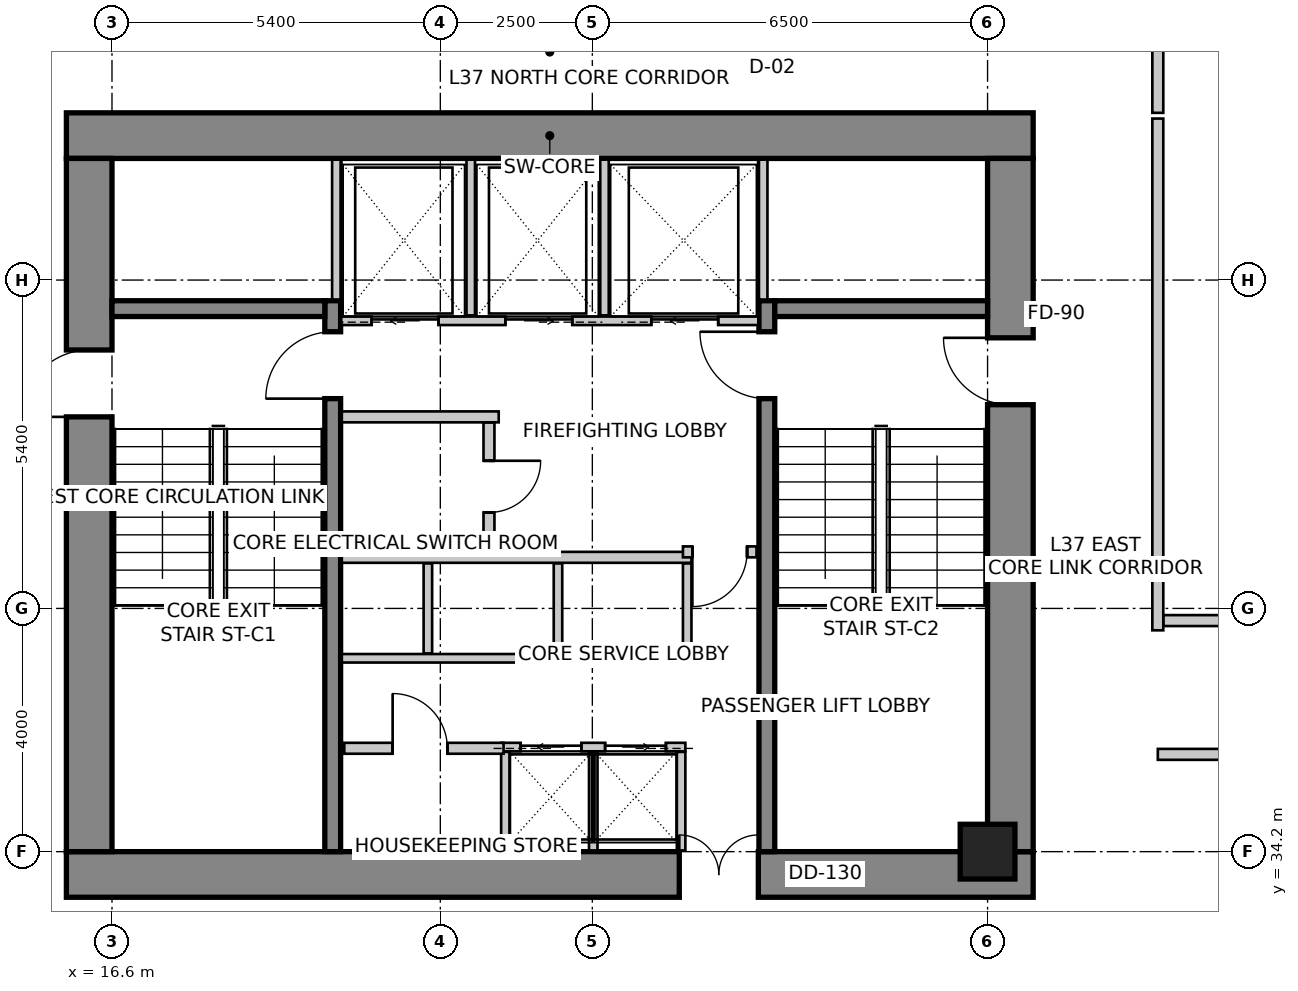
"""IFC4 building model, lengths in metres.
Left out: names, types, materials, properties, quantities, classifications, styles, units other than length and angle.
Written with IfcOpenShell. Run it as: python <this file> out.ifc"""

import sys

from ifc_helpers import new_model, si_unit, direction, frame, frame_2d, origin, origin_2d, place, context, subcontext, project, spatial, rectangle, extrude, source, transform, mapped, element, fill, save


model = new_model("IFC4")
c1 = context("Model", 3, precision=1e-05, world=origin(), true_north=direction((0.0, 1.0)))
c2 = subcontext(c1, "Body", "Model", "MODEL_VIEW")
j1 = project(units=[si_unit("LENGTHUNIT", "METRE"), si_unit("PLANEANGLEUNIT", "RADIAN")], contexts=[c1])
p1 = place(None, origin())
s1 = spatial("IfcSite", under=j1, at=p1, CompositionType="ELEMENT")
p2 = place(p1, origin())
s2 = spatial("IfcBuilding", under=s1, at=p2, CompositionType="ELEMENT")
p3 = place(p2, frame((0.0, 0.0, 150.2)))
s3 = spatial("IfcBuildingStorey", under=s2, at=p3, CompositionType="ELEMENT", Elevation=150.2)
p4 = place(p3, frame((15.85, 45.975, 0.0), z_axis=(0.0, 0.0, 1.0), x_axis=(1.0, 0.0, 0.0)))
e1 = element("IfcWall", 1, at=p4, inside=s3, PredefinedType="SHEAR", context=c2, shape_type="SweptSolid", body=[
    extrude(rectangle(XDim=15.9, YDim=0.75, at=frame_2d((7.95, 0.0))), origin(), (0.0, 0.0, 1.0), 3.6),
])
p5 = place(p3, frame((15.85, 33.825, 0.0), z_axis=(0.0, 0.0, 1.0), x_axis=(1.0, 0.0, 0.0)))
e2 = element("IfcWall", 2, at=p5, inside=s3, PredefinedType="SHEAR", context=c2, shape_type="SweptSolid", body=[
    extrude(rectangle(XDim=15.9, YDim=0.75, at=frame_2d((7.95, 0.0))), origin(), (0.0, 0.0, 1.0), 3.6),
])
m1 = source(origin(), c2, "Body", "SweptSolid", [
    extrude(rectangle(XDim=1.3, YDim=2.15, at=frame_2d((0.65, 1.075))), frame((0.0, 0.385, 0.0), z_axis=(0.0, -1.0, 0.0), x_axis=(1.0, 0.0, 0.0)), (0.0, 0.0, 1.0), 0.77),
])
p6 = place(p5, frame((10.08, 0.0, 0.0)))
e3 = element("IfcOpeningElement", 3, at=p6, cuts=e2, PredefinedType="OPENING", context=c2, shape_type="MappedRepresentation", body=[
    mapped(m1, transform((0.0, 0.0, 0.0), scale=1.0)),
])
p7 = place(p3, frame((16.225, 34.2, 0.0), z_axis=(0.0, 0.0, 1.0), x_axis=(0.0, 1.0, 0.0)))
e4 = element("IfcWall", 4, at=p7, inside=s3, PredefinedType="SHEAR", context=c2, shape_type="SweptSolid", body=[
    extrude(rectangle(XDim=11.4, YDim=0.75, at=frame_2d((5.7, 0.0))), origin(), (0.0, 0.0, 1.0), 3.6),
])
m2 = source(origin(), c2, "Body", "SweptSolid", [
    extrude(rectangle(XDim=1.1, YDim=2.15, at=frame_2d((0.55, 1.075))), frame((0.0, 0.385, 0.0), z_axis=(0.0, -1.0, 0.0), x_axis=(1.0, 0.0, 0.0)), (0.0, 0.0, 1.0), 0.77),
])
p8 = place(p7, frame((7.15, 0.0, 0.0)))
e5 = element("IfcOpeningElement", 5, at=p8, cuts=e4, PredefinedType="OPENING", context=c2, shape_type="MappedRepresentation", body=[
    mapped(m2, transform((0.0, 0.0, 0.0), scale=1.0)),
])
p9 = place(p3, frame((31.375, 34.2, 0.0), z_axis=(0.0, 0.0, 1.0), x_axis=(0.0, 1.0, 0.0)))
e6 = element("IfcWall", 6, at=p9, inside=s3, PredefinedType="SHEAR", context=c2, shape_type="SweptSolid", body=[
    extrude(rectangle(XDim=11.4, YDim=0.75, at=frame_2d((5.7, 0.0))), origin(), (0.0, 0.0, 1.0), 3.6),
])
p10 = place(p9, frame((7.35, 0.0, 0.0)))
e7 = element("IfcOpeningElement", 7, at=p10, cuts=e6, PredefinedType="OPENING", context=c2, shape_type="MappedRepresentation", body=[
    mapped(m2, transform((0.0, 0.0, 0.0), scale=1.0)),
])
p11 = place(p3, frame((20.23, 34.2, 0.0), z_axis=(0.0, 0.0, 1.0), x_axis=(0.0, 1.0, 0.0)))
e8 = element("IfcWall", 8, at=p11, inside=s3, PredefinedType="SHEAR", context=c2, shape_type="SweptSolid", body=[
    extrude(rectangle(XDim=9.06, YDim=0.26, at=frame_2d((4.53, 0.0))), origin(), (0.0, 0.0, 1.0), 3.6),
])
m3 = source(origin(), c2, "Body", "SweptSolid", [
    extrude(rectangle(XDim=1.1, YDim=2.15, at=frame_2d((0.55, 1.075))), frame((0.0, 0.14, 0.0), z_axis=(0.0, -1.0, 0.0), x_axis=(1.0, 0.0, 0.0)), (0.0, 0.0, 1.0), 0.28),
])
p12 = place(p11, frame((7.45, 0.0, 0.0)))
e9 = element("IfcOpeningElement", 9, at=p12, cuts=e8, PredefinedType="OPENING", context=c2, shape_type="MappedRepresentation", body=[
    mapped(m3, transform((0.0, 0.0, 0.0), scale=1.0)),
])
p13 = place(p3, frame((27.37, 34.2, 0.0), z_axis=(0.0, 0.0, 1.0), x_axis=(0.0, 1.0, 0.0)))
e10 = element("IfcWall", 10, at=p13, inside=s3, PredefinedType="SHEAR", context=c2, shape_type="SweptSolid", body=[
    extrude(rectangle(XDim=9.06, YDim=0.26, at=frame_2d((4.53, 0.0))), origin(), (0.0, 0.0, 1.0), 3.6),
])
p14 = place(p13, frame((7.45, 0.0, 0.0)))
e11 = element("IfcOpeningElement", 11, at=p14, cuts=e10, PredefinedType="OPENING", context=c2, shape_type="MappedRepresentation", body=[
    mapped(m3, transform((0.0, 0.0, 0.0), scale=1.0)),
])
for number, where, z_axis, x_axis in (
    (12, (16.6, 43.13, 0.0), (0.0, 0.0, 1.0), (1.0, 0.0, 0.0)),
    (13, (27.5, 43.13, 0.0), (0.0, 0.0, 1.0), (1.0, 0.0, 0.0)),
):
    element("IfcWall", number, at=place(p3, frame(where, z_axis=z_axis, x_axis=x_axis)), inside=s3, PredefinedType="SHEAR", context=c2, shape_type="SweptSolid", body=[
        extrude(rectangle(XDim=3.5, YDim=0.26, at=frame_2d((1.75, 0.0))), origin(), (0.0, 0.0, 1.0), 3.6),
    ])
m4 = source(origin(), c2, "Body", "SweptSolid", [
    extrude(rectangle(XDim=0.9, YDim=0.9, at=origin_2d()), origin(), (0.0, 0.0, 1.0), 3.6),
])
p15 = place(p3, frame((31.0, 34.2, 0.0), z_axis=(0.0, 0.0, 1.0), x_axis=(1.0, 0.0, 0.0)))
e14 = element("IfcColumn", 14, at=p15, inside=s3, PredefinedType="COLUMN", context=c2, shape_type="MappedRepresentation", body=[
    mapped(m4, transform((0.0, 0.0, 0.0), scale=1.0)),
])
p16 = place(p3, frame((21.875, 52.742, 0.0), z_axis=(0.0, 0.0, 1.0), x_axis=(-0.843662465249, -0.536873956092, 0.0)))
e15 = element("IfcWall", 15, at=p16, inside=s3, PredefinedType="SOLIDWALL", context=c2, shape_type="SweptSolid", body=[
    extrude(rectangle(XDim=10.284, YDim=0.3, at=frame_2d((5.142, 0.0))), origin(), (0.0, 0.0, 1.0), 3.35),
])
m5 = source(origin(), c2, "Body", "SweptSolid", [
    extrude(rectangle(XDim=2.4, YDim=2.2, at=frame_2d((1.2, 1.1))), frame((0.0, 0.16, 0.0), z_axis=(0.0, -1.0, 0.0), x_axis=(1.0, 0.0, 0.0)), (0.0, 0.0, 1.0), 0.32),
])
p17 = place(p16, frame((2.656, 0.0, 0.85)))
e16 = element("IfcOpeningElement", 16, at=p17, cuts=e15, PredefinedType="OPENING", context=c2, shape_type="MappedRepresentation", body=[
    mapped(m5, transform((0.0, 0.0, 0.0), scale=1.0)),
])
m6 = source(origin(), c2, "Body", "SweptSolid", [
    extrude(rectangle(XDim=1.5, YDim=1.8, at=frame_2d((0.75, 0.9))), frame((0.0, 0.16, 0.0), z_axis=(0.0, -1.0, 0.0), x_axis=(1.0, 0.0, 0.0)), (0.0, 0.0, 1.0), 0.32),
])
p18 = place(p16, frame((7.937, 0.0, 0.85)))
e17 = element("IfcOpeningElement", 17, at=p18, cuts=e15, PredefinedType="OPENING", context=c2, shape_type="MappedRepresentation", body=[
    mapped(m6, transform((0.0, 0.0, 0.0), scale=1.0)),
])
p19 = place(p3, frame((20.37, 42.93, 0.0), z_axis=(0.0, 0.0, 1.0), x_axis=(1.0, 0.0, 0.0)))
e18 = element("IfcWall", 18, at=p19, inside=s3, PredefinedType="SOLIDWALL", context=c2, shape_type="SweptSolid", body=[
    extrude(rectangle(XDim=6.86, YDim=0.14, at=frame_2d((3.43, 0.0))), origin(), (0.0, 0.0, 1.0), 3.35),
])
m7 = source(origin(), c2, "Body", "SweptSolid", [
    extrude(rectangle(XDim=1.1, YDim=2.15, at=frame_2d((0.55, 1.075))), frame((0.0, 0.08, 0.0), z_axis=(0.0, -1.0, 0.0), x_axis=(1.0, 0.0, 0.0)), (0.0, 0.0, 1.0), 0.16),
])
p20 = place(p19, frame((0.5, 0.0, 0.0)))
e19 = element("IfcOpeningElement", 19, at=p20, cuts=e18, PredefinedType="OPENING", context=c2, shape_type="MappedRepresentation", body=[
    mapped(m7, transform((0.0, 0.0, 0.0), scale=1.0)),
])
p21 = place(p19, frame((2.7, 0.0, 0.0)))
e20 = element("IfcOpeningElement", 20, at=p21, cuts=e18, PredefinedType="OPENING", context=c2, shape_type="MappedRepresentation", body=[
    mapped(m7, transform((0.0, 0.0, 0.0), scale=1.0)),
])
p22 = place(p19, frame((5.1, 0.0, 0.0)))
e21 = element("IfcOpeningElement", 21, at=p22, cuts=e18, PredefinedType="OPENING", context=c2, shape_type="MappedRepresentation", body=[
    mapped(m7, transform((0.0, 0.0, 0.0), scale=1.0)),
])
for number, where, z_axis, x_axis in (
    (22, (20.29, 43.28, 0.0), (0.0, 0.0, 1.0), (0.0, 1.0, 0.0)),
    (23, (27.31, 43.28, 0.0), (0.0, 0.0, 1.0), (0.0, 1.0, 0.0)),
):
    element("IfcWall", number, at=place(p3, frame(where, z_axis=z_axis, x_axis=x_axis)), inside=s3, PredefinedType="SOLIDWALL", context=c2, shape_type="SweptSolid", body=[
        extrude(rectangle(XDim=2.3, YDim=0.14, at=frame_2d((1.15, 0.0))), origin(), (0.0, 0.0, 1.0), 3.35),
    ])
for number, where, z_axis, x_axis in (
    (24, (22.5, 43.02, 0.0), (0.0, 0.0, 1.0), (0.0, 1.0, 0.0)),
    (25, (24.7, 43.02, 0.0), (0.0, 0.0, 1.0), (0.0, 1.0, 0.0)),
):
    element("IfcWall", number, at=place(p3, frame(where, z_axis=z_axis, x_axis=x_axis)), inside=s3, PredefinedType="SOLIDWALL", context=c2, shape_type="SweptSolid", body=[
        extrude(rectangle(XDim=2.56, YDim=0.14, at=frame_2d((1.28, 0.0))), origin(), (0.0, 0.0, 1.0), 3.35),
    ])
p23 = place(p3, frame((23.0, 35.92, 0.0), z_axis=(0.0, 0.0, 1.0), x_axis=(1.0, 0.0, 0.0)))
e26 = element("IfcWall", 26, at=p23, inside=s3, PredefinedType="SOLIDWALL", context=c2, shape_type="SweptSolid", body=[
    extrude(rectangle(XDim=3.03, YDim=0.14, at=frame_2d((1.515, 0.0))), origin(), (0.0, 0.0, 1.0), 3.35),
])
m8 = source(origin(), c2, "Body", "SweptSolid", [
    extrude(rectangle(XDim=1.0, YDim=2.15, at=frame_2d((0.5, 1.075))), frame((0.0, 0.08, 0.0), z_axis=(0.0, -1.0, 0.0), x_axis=(1.0, 0.0, 0.0)), (0.0, 0.0, 1.0), 0.16),
])
p24 = place(p23, frame((0.32, 0.0, 0.0)))
e27 = element("IfcOpeningElement", 27, at=p24, cuts=e26, PredefinedType="OPENING", context=c2, shape_type="MappedRepresentation", body=[
    mapped(m8, transform((0.0, 0.0, 0.0), scale=1.0)),
])
p25 = place(p23, frame((1.71, 0.0, 0.0)))
e28 = element("IfcOpeningElement", 28, at=p25, cuts=e26, PredefinedType="OPENING", context=c2, shape_type="MappedRepresentation", body=[
    mapped(m8, transform((0.0, 0.0, 0.0), scale=1.0)),
])
for number, where, z_axis, x_axis in (
    (29, (25.96, 34.22, 0.0), (0.0, 0.0, 1.0), (0.0, 1.0, 0.0)),
    (30, (23.07, 34.22, 0.0), (0.0, 0.0, 1.0), (0.0, 1.0, 0.0)),
    (31, (24.515, 34.22, 0.0), (0.0, 0.0, 1.0), (0.0, 1.0, 0.0)),
):
    element("IfcWall", number, at=place(p3, frame(where, z_axis=z_axis, x_axis=x_axis)), inside=s3, PredefinedType="SOLIDWALL", context=c2, shape_type="SweptSolid", body=[
        extrude(rectangle(XDim=1.62, YDim=0.14, at=frame_2d((0.81, 0.0))), origin(), (0.0, 0.0, 1.0), 2.642),
    ])
p26 = place(p3, frame((20.38, 37.38, 0.0), z_axis=(0.0, 0.0, 1.0), x_axis=(1.0, 0.0, 0.0)))
e32 = element("IfcWall", 32, at=p26, inside=s3, PredefinedType="SOLIDWALL", context=c2, shape_type="SweptSolid", body=[
    extrude(rectangle(XDim=5.75, YDim=0.14, at=frame_2d((2.875, 0.0))), origin(), (0.0, 0.0, 1.0), 3.35),
])
p27 = place(p3, frame((20.38, 39.04, 0.0), z_axis=(0.0, 0.0, 1.0), x_axis=(1.0, 0.0, 0.0)))
e33 = element("IfcWall", 33, at=p27, inside=s3, PredefinedType="SOLIDWALL", context=c2, shape_type="SweptSolid", body=[
    extrude(rectangle(XDim=5.75, YDim=0.18, at=frame_2d((2.875, 0.0))), origin(), (0.0, 0.0, 1.0), 3.35),
])
for number, where, z_axis, x_axis in (
    (34, (26.06, 37.46, 0.0), (0.0, 0.0, 1.0), (0.0, 1.0, 0.0)),
    (35, (21.795, 37.46, 0.0), (0.0, 0.0, 1.0), (0.0, 1.0, 0.0)),
    (36, (23.935, 37.46, 0.0), (0.0, 0.0, 1.0), (0.0, 1.0, 0.0)),
):
    element("IfcWall", number, at=place(p3, frame(where, z_axis=z_axis, x_axis=x_axis)), inside=s3, PredefinedType="SOLIDWALL", context=c2, shape_type="SweptSolid", body=[
        extrude(rectangle(XDim=1.48, YDim=0.14, at=frame_2d((0.74, 0.0))), origin(), (0.0, 0.0, 1.0), 3.35),
    ])
p28 = place(p3, frame((22.96, 41.35, 0.0), z_axis=(0.0, 0.0, 1.0), x_axis=(-1.0, 0.0, 0.0)))
e37 = element("IfcWall", 37, at=p28, inside=s3, PredefinedType="PARTITIONING", context=c2, shape_type="SweptSolid", body=[
    extrude(rectangle(XDim=2.58, YDim=0.18, at=frame_2d((1.29, 0.0))), origin(), (0.0, 0.0, 1.0), 3.35),
])
p29 = place(p3, frame((22.8, 41.256, 0.0), z_axis=(0.0, 0.0, 1.0), x_axis=(0.0, -1.0, 0.0)))
e38 = element("IfcWall", 38, at=p29, inside=s3, PredefinedType="PARTITIONING", context=c2, shape_type="SweptSolid", body=[
    extrude(rectangle(XDim=2.106, YDim=0.18, at=frame_2d((1.053, 0.0))), origin(), (0.0, 0.0, 1.0), 3.35),
])
m9 = source(origin(), c2, "Body", "SweptSolid", [
    extrude(rectangle(XDim=0.85, YDim=2.15, at=frame_2d((0.425, 1.075))), frame((0.0, 0.1, 0.0), z_axis=(0.0, -1.0, 0.0), x_axis=(1.0, 0.0, 0.0)), (0.0, 0.0, 1.0), 0.2),
])
p30 = place(p29, frame((0.628, 0.0, 0.0)))
e39 = element("IfcOpeningElement", 39, at=p30, cuts=e38, PredefinedType="OPENING", context=c2, shape_type="MappedRepresentation", body=[
    mapped(m9, transform((0.0, 0.0, 0.0), scale=1.0)),
])
p31 = place(p3, frame((27.2, 39.13, 0.0), z_axis=(0.0, 0.0, 1.0), x_axis=(-1.0, 0.0, 0.0)))
e40 = element("IfcWall", 40, at=p31, inside=s3, PredefinedType="PARTITIONING", context=c2, shape_type="SweptSolid", body=[
    extrude(rectangle(XDim=1.21, YDim=0.18, at=frame_2d((0.605, 0.0))), origin(), (0.0, 0.0, 1.0), 3.35),
])
m10 = source(origin(), c2, "Body", "SweptSolid", [
    extrude(rectangle(XDim=0.9, YDim=2.15, at=frame_2d((0.45, 1.075))), frame((0.0, 0.1, 0.0), z_axis=(0.0, -1.0, 0.0), x_axis=(1.0, 0.0, 0.0)), (0.0, 0.0, 1.0), 0.2),
])
p32 = place(p31, frame((0.155, 0.0, 0.0)))
e41 = element("IfcOpeningElement", 41, at=p32, cuts=e40, PredefinedType="OPENING", context=c2, shape_type="MappedRepresentation", body=[
    mapped(m10, transform((0.0, 0.0, 0.0), scale=1.0)),
])
p33 = place(p3, frame((20.42, 35.9, 0.0), z_axis=(0.0, 0.0, 1.0), x_axis=(1.0, 0.0, 0.0)))
e42 = element("IfcWall", 42, at=p33, inside=s3, PredefinedType="PARTITIONING", context=c2, shape_type="SweptSolid", body=[
    extrude(rectangle(XDim=2.62, YDim=0.18, at=frame_2d((1.31, 0.0))), origin(), (0.0, 0.0, 1.0), 3.35),
])
p34 = place(p33, frame((0.796, 0.0, 0.0)))
e43 = element("IfcOpeningElement", 43, at=p34, cuts=e42, PredefinedType="OPENING", context=c2, shape_type="MappedRepresentation", body=[
    mapped(m10, transform((0.0, 0.0, 0.0), scale=1.0)),
])
p35 = place(p3, frame((33.8, 48.5, 0.0), z_axis=(0.0, 0.0, 1.0), x_axis=(0.0, -1.0, 0.0)))
e44 = element("IfcWall", 44, at=p35, inside=s3, PredefinedType="PARTITIONING", context=c2, shape_type="SweptSolid", body=[
    extrude(rectangle(XDim=2.15, YDim=0.18, at=frame_2d((1.075, 0.0))), origin(), (0.0, 0.0, 1.0), 2.492),
])
p36 = place(p3, frame((33.8, 46.256, 0.0), z_axis=(0.0, 0.0, 1.0), x_axis=(0.0, -1.0, 0.0)))
e45 = element("IfcWall", 45, at=p36, inside=s3, PredefinedType="PARTITIONING", context=c2, shape_type="SweptSolid", body=[
    extrude(rectangle(XDim=8.416, YDim=0.18, at=frame_2d((4.208, 0.0))), origin(), (0.0, 0.0, 1.0), 2.879),
])
p37 = place(p3, frame((33.894, 38.0, 0.0), z_axis=(0.0, 0.0, 1.0), x_axis=(1.0, 0.0, 0.0)))
e46 = element("IfcWall", 46, at=p37, inside=s3, PredefinedType="PARTITIONING", context=c2, shape_type="SweptSolid", body=[
    extrude(rectangle(XDim=7.933, YDim=0.18, at=frame_2d((3.966, 0.0))), origin(), (0.0, 0.0, 1.0), 2.803),
])
p38 = place(p37, frame((3.455, 0.0, 0.0)))
e47 = element("IfcOpeningElement", 47, at=p38, cuts=e46, PredefinedType="OPENING", context=c2, shape_type="MappedRepresentation", body=[
    mapped(m10, transform((0.0, 0.0, 0.0), scale=1.0)),
])
p39 = place(p3, frame((49.441, 35.8, 0.0), z_axis=(0.0, 0.0, 1.0), x_axis=(-1.0, 0.0, 0.0)))
e48 = element("IfcWall", 48, at=p39, inside=s3, PredefinedType="PARTITIONING", context=c2, shape_type="SweptSolid", body=[
    extrude(rectangle(XDim=15.641, YDim=0.18, at=frame_2d((7.82, 0.0))), origin(), (0.0, 0.0, 1.0), 2.803),
])
p40 = place(p39, frame((7.371, 0.0, 0.0)))
e49 = element("IfcOpeningElement", 49, at=p40, cuts=e48, PredefinedType="OPENING", context=c2, shape_type="MappedRepresentation", body=[
    mapped(m10, transform((0.0, 0.0, 0.0), scale=1.0)),
])
m11 = source(origin(), c2, "Body", "SweptSolid", [
    extrude(rectangle(XDim=1.1, YDim=2.15, at=frame_2d((0.55, 1.075))), frame((0.0, 0.025, 0.0), z_axis=(0.0, -1.0, 0.0), x_axis=(1.0, 0.0, 0.0)), (0.0, 0.0, 1.0), 0.05),
])
p41 = place(p20, origin())
e50 = element("IfcDoor", 50, at=p41, inside=s3, OperationType="SLIDING_TO_LEFT", PredefinedType="DOOR", context=c2, shape_type="MappedRepresentation", body=[
    mapped(m11, transform((0.0, 0.0, 0.0), scale=1.0)),
])
fill(e19, e50)
p42 = place(p21, origin())
e51 = element("IfcDoor", 51, at=p42, inside=s3, OperationType="SLIDING_TO_RIGHT", PredefinedType="DOOR", context=c2, shape_type="MappedRepresentation", body=[
    mapped(m11, transform((0.0, 0.0, 0.0), scale=1.0)),
])
fill(e20, e51)
m12 = source(origin(), c2, "Body", "SweptSolid", [
    extrude(rectangle(XDim=1.1, YDim=2.15, at=frame_2d((0.55, 1.075))), frame((0.0, 0.025, 0.0), z_axis=(0.0, -1.0, 0.0), x_axis=(1.0, 0.0, 0.0)), (0.0, 0.0, 1.0), 0.05),
])
p43 = place(p22, origin())
e52 = element("IfcDoor", 52, at=p43, inside=s3, OperationType="SLIDING_TO_LEFT", PredefinedType="DOOR", context=c2, shape_type="MappedRepresentation", body=[
    mapped(m12, transform((0.0, 0.0, 0.0), scale=1.0)),
])
fill(e21, e52)
m13 = source(origin(), c2, "Body", "SweptSolid", [
    extrude(rectangle(XDim=1.0, YDim=2.15, at=frame_2d((0.5, 1.075))), frame((0.0, 0.025, 0.0), z_axis=(0.0, -1.0, 0.0), x_axis=(1.0, 0.0, 0.0)), (0.0, 0.0, 1.0), 0.05),
])
p44 = place(p24, origin())
e53 = element("IfcDoor", 53, at=p44, inside=s3, OperationType="SLIDING_TO_LEFT", PredefinedType="DOOR", context=c2, shape_type="MappedRepresentation", body=[
    mapped(m13, transform((0.0, 0.0, 0.0), scale=1.0)),
])
fill(e27, e53)
p45 = place(p25, origin())
e54 = element("IfcDoor", 54, at=p45, inside=s3, OperationType="SLIDING_TO_RIGHT", PredefinedType="DOOR", context=c2, shape_type="MappedRepresentation", body=[
    mapped(m13, transform((0.0, 0.0, 0.0), scale=1.0)),
])
fill(e28, e54)
m14 = source(origin(), c2, "Body", "SweptSolid", [
    extrude(rectangle(XDim=1.1, YDim=2.15, at=frame_2d((0.55, 1.075))), frame((0.0, 0.025, 0.0), z_axis=(0.0, -1.0, 0.0), x_axis=(1.0, 0.0, 0.0)), (0.0, 0.0, 1.0), 0.05),
])
p46 = place(p12, origin())
e55 = element("IfcDoor", 55, at=p46, inside=s3, OperationType="SINGLE_SWING_LEFT", PredefinedType="DOOR", context=c2, shape_type="MappedRepresentation", body=[
    mapped(m14, transform((0.0, 0.0, 0.0), scale=1.0)),
])
fill(e9, e55)
p47 = place(p14, origin())
e56 = element("IfcDoor", 56, at=p47, inside=s3, OperationType="SINGLE_SWING_RIGHT", PredefinedType="DOOR", context=c2, shape_type="MappedRepresentation", body=[
    mapped(m14, transform((0.0, 0.0, 0.0), scale=1.0)),
])
fill(e11, e56)
p48 = place(p8, origin())
e57 = element("IfcDoor", 57, at=p48, inside=s3, OperationType="SINGLE_SWING_LEFT", PredefinedType="DOOR", context=c2, shape_type="MappedRepresentation", body=[
    mapped(m14, transform((0.0, 0.0, 0.0), scale=1.0)),
])
fill(e5, e57)
p49 = place(p10, origin())
e58 = element("IfcDoor", 58, at=p49, inside=s3, OperationType="SINGLE_SWING_RIGHT", PredefinedType="DOOR", context=c2, shape_type="MappedRepresentation", body=[
    mapped(m14, transform((0.0, 0.0, 0.0), scale=1.0)),
])
fill(e7, e58)
m15 = source(origin(), c2, "Body", "SweptSolid", [
    extrude(rectangle(XDim=1.3, YDim=2.15, at=frame_2d((0.65, 1.075))), frame((0.0, 0.025, 0.0), z_axis=(0.0, -1.0, 0.0), x_axis=(1.0, 0.0, 0.0)), (0.0, 0.0, 1.0), 0.05),
])
p50 = place(p6, origin())
e59 = element("IfcDoor", 59, at=p50, inside=s3, OperationType="DOUBLE_DOOR_SINGLE_SWING", PredefinedType="DOOR", context=c2, shape_type="MappedRepresentation", body=[
    mapped(m15, transform((0.0, 0.0, 0.0), scale=1.0)),
])
fill(e3, e59)
m16 = source(origin(), c2, "Body", "SweptSolid", [
    extrude(rectangle(XDim=0.85, YDim=2.15, at=frame_2d((0.425, 1.075))), frame((0.0, 0.025, 0.0), z_axis=(0.0, -1.0, 0.0), x_axis=(1.0, 0.0, 0.0)), (0.0, 0.0, 1.0), 0.05),
])
p51 = place(p30, origin())
e60 = element("IfcDoor", 60, at=p51, inside=s3, OperationType="SINGLE_SWING_LEFT", PredefinedType="DOOR", context=c2, shape_type="MappedRepresentation", body=[
    mapped(m16, transform((0.0, 0.0, 0.0), scale=1.0)),
])
fill(e39, e60)
m17 = source(origin(), c2, "Body", "SweptSolid", [
    extrude(rectangle(XDim=0.9, YDim=2.15, at=frame_2d((0.45, 1.075))), frame((0.0, 0.025, 0.0), z_axis=(0.0, -1.0, 0.0), x_axis=(1.0, 0.0, 0.0)), (0.0, 0.0, 1.0), 0.05),
])
p52 = place(p32, origin())
e61 = element("IfcDoor", 61, at=p52, inside=s3, OperationType="SINGLE_SWING_RIGHT", PredefinedType="DOOR", context=c2, shape_type="MappedRepresentation", body=[
    mapped(m17, transform((0.0, 0.0, 0.0), scale=1.0)),
])
fill(e41, e61)
p53 = place(p34, origin())
e62 = element("IfcDoor", 62, at=p53, inside=s3, OperationType="SINGLE_SWING_LEFT", PredefinedType="DOOR", context=c2, shape_type="MappedRepresentation", body=[
    mapped(m17, transform((0.0, 0.0, 0.0), scale=1.0)),
])
fill(e43, e62)
save(model, sys.argv[1])
